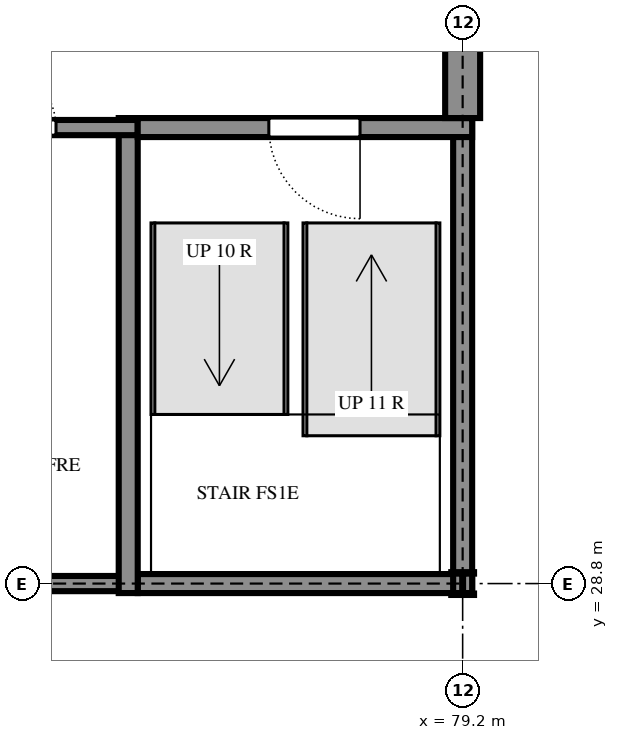
"""IFC4 building model, lengths in metres.
Left out: names, types, materials, properties, quantities, classifications, styles, units other than length and angle.
Written with IfcOpenShell. Run it as: python <this file> out.ifc"""

import sys

from ifc_helpers import new_model, si_unit, direction, frame, frame_2d, origin, origin_2d, place, context, subcontext, project, spatial, rectangle, i_section, extrude, element, fill, save


model = new_model("IFC4")
c1 = context("Model", 3, precision=1e-05, world=origin(), true_north=direction((0.0, 1.0)))
c2 = subcontext(c1, "Body", "Model", "MODEL_VIEW")
j1 = project(units=[si_unit("LENGTHUNIT", "METRE"), si_unit("PLANEANGLEUNIT", "RADIAN")], contexts=[c1])
p1 = place(None, origin())
s1 = spatial("IfcSite", under=j1, at=p1, CompositionType="ELEMENT")
p2 = place(p1, origin())
s2 = spatial("IfcBuilding", under=s1, at=p2, CompositionType="ELEMENT")
p3 = place(p2, origin())
s3 = spatial("IfcBuildingStorey", under=s2, at=p3, CompositionType="ELEMENT", Elevation=0.0)
p4 = place(p3, frame((79.2, 28.8, -0.3), z_axis=(0.0, 0.0, 1.0), x_axis=(1.0, 0.0, 0.0)))
e1 = element("IfcColumn", 1, at=p4, inside=s3, PredefinedType="COLUMN", context=c2, shape_type="SweptSolid", body=[
    extrude(i_section(OverallWidth=0.3, OverallDepth=0.3, WebThickness=0.011, FlangeThickness=0.019, FilletRadius=0.027, at=origin_2d()), origin(), (0.0, 0.0, 1.0), 3.9),
])
p5 = place(p3, frame((71.9, 28.8, 0.0), z_axis=(0.0, 0.0, 1.0), x_axis=(1.0, 0.0, 0.0)))
e2 = element("IfcWall", 2, at=p5, inside=s3, PredefinedType="SHEAR", context=c2, shape_type="SweptSolid", body=[
    extrude(rectangle(XDim=3.025, YDim=0.2, at=frame_2d((1.513, 0.0))), origin(), (0.0, 0.0, 1.0), 3.6),
])
p6 = place(p3, frame((74.925, 28.8, 0.0), z_axis=(0.0, 0.0, 1.0), x_axis=(1.0, 0.0, 0.0)))
e3 = element("IfcWall", 3, at=p6, inside=s3, PredefinedType="SHEAR", context=c2, shape_type="SweptSolid", body=[
    extrude(rectangle(XDim=4.4, YDim=0.25, at=frame_2d((2.2, 0.0))), origin(), (0.0, 0.0, 1.0), 3.6),
])
for number, where, z_axis, x_axis in (
    (4, (79.2, 28.675, 0.0), (0.0, 0.0, 1.0), (0.0, 1.0, 0.0)),
    (5, (74.8, 34.925, 0.0), (0.0, 0.0, 1.0), (0.0, -1.0, 0.0)),
):
    element("IfcWall", number, at=place(p3, frame(where, z_axis=z_axis, x_axis=x_axis)), inside=s3, PredefinedType="SHEAR", context=c2, shape_type="SweptSolid", body=[
        extrude(rectangle(XDim=6.25, YDim=0.25, at=frame_2d((3.125, 0.0))), origin(), (0.0, 0.0, 1.0), 3.6),
    ])
p7 = place(p3, frame((74.925, 34.8, 0.0), z_axis=(0.0, 0.0, 1.0), x_axis=(-1.0, 0.0, 0.0)))
e6 = element("IfcWall", 6, at=p7, inside=s3, PredefinedType="SHEAR", context=c2, shape_type="SweptSolid", body=[
    extrude(rectangle(XDim=3.025, YDim=0.2, at=frame_2d((1.513, 0.0))), origin(), (0.0, 0.0, 1.0), 3.6),
])
p8 = place(p7, frame((1.075, 0.0, 0.0)))
e7 = element("IfcOpeningElement", 7, at=p8, cuts=e6, PredefinedType="OPENING", context=c2, shape_type="SweptSolid", body=[
    extrude(rectangle(XDim=0.85, YDim=2.1, at=frame_2d((0.425, 1.05))), frame((0.0, 0.11, 0.0), z_axis=(0.0, -1.0, 0.0), x_axis=(1.0, 0.0, 0.0)), (0.0, 0.0, 1.0), 0.22),
])
p9 = place(p3, frame((79.325, 34.8, 0.0), z_axis=(0.0, 0.0, 1.0), x_axis=(-1.0, 0.0, 0.0)))
e8 = element("IfcWall", 8, at=p9, inside=s3, PredefinedType="SHEAR", context=c2, shape_type="SweptSolid", body=[
    extrude(rectangle(XDim=4.4, YDim=0.25, at=frame_2d((2.2, 0.0))), origin(), (0.0, 0.0, 1.0), 3.6),
])
p10 = place(p9, frame((1.475, 0.0, 0.0)))
e9 = element("IfcOpeningElement", 9, at=p10, cuts=e8, PredefinedType="OPENING", context=c2, shape_type="SweptSolid", body=[
    extrude(rectangle(XDim=1.2, YDim=2.4, at=frame_2d((0.6, 1.2))), frame((0.0, 0.135, 0.0), z_axis=(0.0, -1.0, 0.0), x_axis=(1.0, 0.0, 0.0)), (0.0, 0.0, 1.0), 0.27),
])
p11 = place(p3, frame((79.2, 34.925, 0.0), z_axis=(0.0, 0.0, 1.0), x_axis=(0.0, 1.0, 0.0)))
e10 = element("IfcWall", 10, at=p11, inside=s3, PredefinedType="SOLIDWALL", context=c2, shape_type="SweptSolid", body=[
    extrude(rectangle(XDim=1.225, YDim=0.46, at=frame_2d((0.612, 0.0))), origin(), (0.0, 0.0, 1.0), 3.22),
])
p12 = place(p10, origin())
e11 = element("IfcDoor", 11, at=p12, inside=s3, OperationType="SINGLE_SWING_RIGHT", PredefinedType="DOOR", context=c2, shape_type="SweptSolid", body=[
    extrude(rectangle(XDim=1.2, YDim=2.4, at=frame_2d((0.6, 1.2))), frame((0.0, 0.025, 0.0), z_axis=(0.0, -1.0, 0.0), x_axis=(1.0, 0.0, 0.0)), (0.0, 0.0, 1.0), 0.05),
])
fill(e9, e11)
p13 = place(p8, frame((0.85, 0.0, 0.0), z_axis=(0.0, 0.0, 1.0), x_axis=(-1.0, 0.0, 0.0)))
e12 = element("IfcDoor", 12, at=p13, inside=s3, OperationType="SINGLE_SWING_RIGHT", PredefinedType="DOOR", context=c2, shape_type="SweptSolid", body=[
    extrude(rectangle(XDim=0.85, YDim=2.1, at=frame_2d((0.425, 1.05))), frame((0.0, 0.025, 0.0), z_axis=(0.0, -1.0, 0.0), x_axis=(1.0, 0.0, 0.0)), (0.0, 0.0, 1.0), 0.05),
])
fill(e7, e12)
save(model, sys.argv[1])
